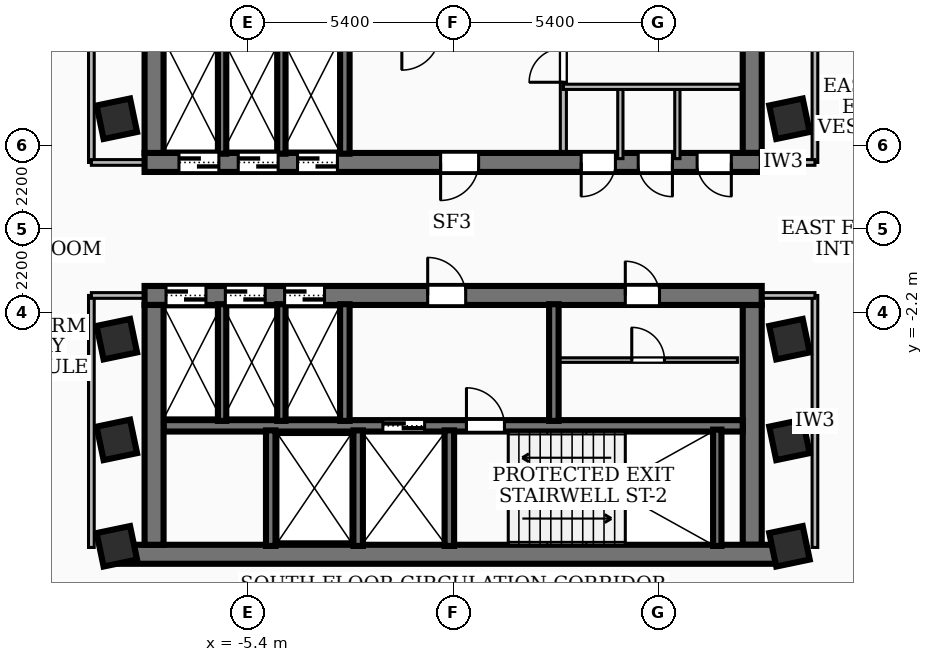
"""IFC4 building model, lengths in metres.
Left out: names, types, materials, properties, quantities, classifications, styles, units other than length and angle.
Written with IfcOpenShell. Run it as: python <this file> out.ifc"""

import sys

from ifc_helpers import new_model, si_unit, direction, frame, frame_2d, origin, origin_2d, place, context, subcontext, project, spatial, rectangle, extrude, element, fill, save


model = new_model("IFC4")
c1 = context("Model", 3, precision=1e-05, world=origin(), true_north=direction((0.0, 1.0)))
c2 = subcontext(c1, "Body", "Model", "MODEL_VIEW")
j1 = project(units=[si_unit("LENGTHUNIT", "METRE"), si_unit("PLANEANGLEUNIT", "RADIAN")], contexts=[c1])
p1 = place(None, origin())
s1 = spatial("IfcSite", under=j1, at=p1, CompositionType="ELEMENT")
p2 = place(p1, origin())
s2 = spatial("IfcBuilding", under=s1, at=p2, CompositionType="ELEMENT")
p3 = place(p2, frame((0.0, 0.0, 111.96)))
s3 = spatial("IfcBuildingStorey", under=s2, at=p3, CompositionType="ELEMENT", Elevation=111.96)
p4 = place(p3, frame((8.12, 1.75, 0.0), z_axis=(0.0, 0.0, 1.0), x_axis=(-1.0, 0.0, 0.0)))
e1 = element("IfcWall", 1, at=p4, inside=s3, PredefinedType="SHEAR", context=c2, shape_type="SweptSolid", body=[
    extrude(rectangle(XDim=16.24, YDim=0.5, at=frame_2d((8.12, 0.0))), origin(), (0.0, 0.0, 1.0), 4.06),
])
p5 = place(p4, frame((7.45, 0.0, 0.0)))
e2 = element("IfcOpeningElement", 2, at=p5, cuts=e1, PredefinedType="OPENING", context=c2, shape_type="SweptSolid", body=[
    extrude(rectangle(XDim=1.0, YDim=2.1, at=frame_2d((0.5, 1.05))), frame((0.0, 0.26, 0.0), z_axis=(0.0, -1.0, 0.0), x_axis=(1.0, 0.0, 0.0)), (0.0, 0.0, 1.0), 0.52),
])
p6 = place(p4, frame((14.285, 0.0, 0.0)))
e3 = element("IfcOpeningElement", 3, at=p6, cuts=e1, PredefinedType="OPENING", context=c2, shape_type="SweptSolid", body=[
    extrude(rectangle(XDim=1.05, YDim=2.15, at=frame_2d((0.525, 1.075))), frame((0.0, 0.26, 0.0), z_axis=(0.0, -1.0, 0.0), x_axis=(1.0, 0.0, 0.0)), (0.0, 0.0, 1.0), 0.52),
])
p7 = place(p4, frame((12.725, 0.0, 0.0)))
e4 = element("IfcOpeningElement", 4, at=p7, cuts=e1, PredefinedType="OPENING", context=c2, shape_type="SweptSolid", body=[
    extrude(rectangle(XDim=1.05, YDim=2.15, at=frame_2d((0.525, 1.075))), frame((0.0, 0.26, 0.0), z_axis=(0.0, -1.0, 0.0), x_axis=(1.0, 0.0, 0.0)), (0.0, 0.0, 1.0), 0.52),
])
p8 = place(p4, frame((11.165, 0.0, 0.0)))
e5 = element("IfcOpeningElement", 5, at=p8, cuts=e1, PredefinedType="OPENING", context=c2, shape_type="SweptSolid", body=[
    extrude(rectangle(XDim=1.05, YDim=2.15, at=frame_2d((0.525, 1.075))), frame((0.0, 0.26, 0.0), z_axis=(0.0, -1.0, 0.0), x_axis=(1.0, 0.0, 0.0)), (0.0, 0.0, 1.0), 0.52),
])
p9 = place(p4, frame((3.85, 0.0, 0.0)))
e6 = element("IfcOpeningElement", 6, at=p9, cuts=e1, PredefinedType="OPENING", context=c2, shape_type="SweptSolid", body=[
    extrude(rectangle(XDim=0.9, YDim=2.06, at=frame_2d((0.45, 1.03))), frame((0.0, 0.26, 0.0), z_axis=(0.0, -1.0, 0.0), x_axis=(1.0, 0.0, 0.0)), (0.0, 0.0, 1.0), 0.52),
])
p10 = place(p4, frame((2.35, 0.0, 0.0)))
e7 = element("IfcOpeningElement", 7, at=p10, cuts=e1, PredefinedType="OPENING", context=c2, shape_type="SweptSolid", body=[
    extrude(rectangle(XDim=0.9, YDim=2.06, at=frame_2d((0.45, 1.03))), frame((0.0, 0.26, 0.0), z_axis=(0.0, -1.0, 0.0), x_axis=(1.0, 0.0, 0.0)), (0.0, 0.0, 1.0), 0.52),
])
p11 = place(p4, frame((0.8, 0.0, 0.0)))
e8 = element("IfcOpeningElement", 8, at=p11, cuts=e1, PredefinedType="OPENING", context=c2, shape_type="SweptSolid", body=[
    extrude(rectangle(XDim=0.9, YDim=2.06, at=frame_2d((0.45, 1.03))), frame((0.0, 0.26, 0.0), z_axis=(0.0, -1.0, 0.0), x_axis=(1.0, 0.0, 0.0)), (0.0, 0.0, 1.0), 0.52),
])
for number, where, z_axis, x_axis in (
    (9, (-7.87, 2.0, 0.0), (0.0, 0.0, 1.0), (0.0, 1.0, 0.0)),
    (10, (7.87, 8.31, 0.0), (0.0, 0.0, 1.0), (0.0, -1.0, 0.0)),
):
    element("IfcWall", number, at=place(p3, frame(where, z_axis=z_axis, x_axis=x_axis)), inside=s3, PredefinedType="SHEAR", context=c2, shape_type="SweptSolid", body=[
        extrude(rectangle(XDim=6.31, YDim=0.5, at=frame_2d((3.155, 0.0))), origin(), (0.0, 0.0, 1.0), 4.06),
    ])
p12 = place(p3, frame((8.78, -8.56, 0.0), z_axis=(0.0, 0.0, 1.0), x_axis=(-1.0, 0.0, 0.0)))
e11 = element("IfcWall", 11, at=p12, inside=s3, PredefinedType="SHEAR", context=c2, shape_type="SweptSolid", body=[
    extrude(rectangle(XDim=17.56, YDim=0.5, at=frame_2d((8.78, 0.0))), origin(), (0.0, 0.0, 1.0), 4.06),
])
p13 = place(p3, frame((-8.12, -1.75, 0.0), z_axis=(0.0, 0.0, 1.0), x_axis=(1.0, 0.0, 0.0)))
e12 = element("IfcWall", 12, at=p13, inside=s3, PredefinedType="SHEAR", context=c2, shape_type="SweptSolid", body=[
    extrude(rectangle(XDim=16.24, YDim=0.5, at=frame_2d((8.12, 0.0))), origin(), (0.0, 0.0, 1.0), 4.06),
])
p14 = place(p13, frame((7.45, 0.0, 0.0)))
e13 = element("IfcOpeningElement", 13, at=p14, cuts=e12, PredefinedType="OPENING", context=c2, shape_type="SweptSolid", body=[
    extrude(rectangle(XDim=1.0, YDim=2.1, at=frame_2d((0.5, 1.05))), frame((0.0, 0.26, 0.0), z_axis=(0.0, -1.0, 0.0), x_axis=(1.0, 0.0, 0.0)), (0.0, 0.0, 1.0), 0.52),
])
p15 = place(p13, frame((12.65, 0.0, 0.0)))
e14 = element("IfcOpeningElement", 14, at=p15, cuts=e12, PredefinedType="OPENING", context=c2, shape_type="SweptSolid", body=[
    extrude(rectangle(XDim=0.9, YDim=2.06, at=frame_2d((0.45, 1.03))), frame((0.0, 0.26, 0.0), z_axis=(0.0, -1.0, 0.0), x_axis=(1.0, 0.0, 0.0)), (0.0, 0.0, 1.0), 0.52),
])
p16 = place(p13, frame((0.565, 0.0, 0.0)))
e15 = element("IfcOpeningElement", 15, at=p16, cuts=e12, PredefinedType="OPENING", context=c2, shape_type="SweptSolid", body=[
    extrude(rectangle(XDim=1.05, YDim=2.15, at=frame_2d((0.525, 1.075))), frame((0.0, 0.26, 0.0), z_axis=(0.0, -1.0, 0.0), x_axis=(1.0, 0.0, 0.0)), (0.0, 0.0, 1.0), 0.52),
])
p17 = place(p13, frame((2.125, 0.0, 0.0)))
e16 = element("IfcOpeningElement", 16, at=p17, cuts=e12, PredefinedType="OPENING", context=c2, shape_type="SweptSolid", body=[
    extrude(rectangle(XDim=1.05, YDim=2.15, at=frame_2d((0.525, 1.075))), frame((0.0, 0.26, 0.0), z_axis=(0.0, -1.0, 0.0), x_axis=(1.0, 0.0, 0.0)), (0.0, 0.0, 1.0), 0.52),
])
p18 = place(p13, frame((3.685, 0.0, 0.0)))
e17 = element("IfcOpeningElement", 17, at=p18, cuts=e12, PredefinedType="OPENING", context=c2, shape_type="SweptSolid", body=[
    extrude(rectangle(XDim=1.05, YDim=2.15, at=frame_2d((0.525, 1.075))), frame((0.0, 0.26, 0.0), z_axis=(0.0, -1.0, 0.0), x_axis=(1.0, 0.0, 0.0)), (0.0, 0.0, 1.0), 0.52),
])
for number, where, z_axis, x_axis in (
    (18, (-7.87, -8.31, 0.0), (0.0, 0.0, 1.0), (0.0, 1.0, 0.0)),
    (19, (7.87, -2.0, 0.0), (0.0, 0.0, 1.0), (0.0, -1.0, 0.0)),
):
    element("IfcWall", number, at=place(p3, frame(where, z_axis=z_axis, x_axis=x_axis)), inside=s3, PredefinedType="SHEAR", context=c2, shape_type="SweptSolid", body=[
        extrude(rectangle(XDim=6.31, YDim=0.5, at=frame_2d((3.155, 0.0))), origin(), (0.0, 0.0, 1.0), 4.06),
    ])
p19 = place(p3, frame((-7.62, -5.18, 0.0), z_axis=(0.0, 0.0, 1.0), x_axis=(1.0, 0.0, 0.0)))
e20 = element("IfcWall", 20, at=p19, inside=s3, PredefinedType="SOLIDWALL", context=c2, shape_type="SweptSolid", body=[
    extrude(rectangle(XDim=15.24, YDim=0.3, at=frame_2d((7.62, 0.0))), origin(), (0.0, 0.0, 1.0), 4.06),
])
p20 = place(p19, frame((5.77, 0.0, 0.0)))
e21 = element("IfcOpeningElement", 21, at=p20, cuts=e20, PredefinedType="OPENING", context=c2, shape_type="SweptSolid", body=[
    extrude(rectangle(XDim=1.1, YDim=2.15, at=frame_2d((0.55, 1.075))), frame((0.0, 0.16, 0.0), z_axis=(0.0, -1.0, 0.0), x_axis=(1.0, 0.0, 0.0)), (0.0, 0.0, 1.0), 0.32),
])
p21 = place(p19, frame((7.97, 0.0, 0.0)))
e22 = element("IfcOpeningElement", 22, at=p21, cuts=e20, PredefinedType="OPENING", context=c2, shape_type="SweptSolid", body=[
    extrude(rectangle(XDim=1.0, YDim=2.1, at=frame_2d((0.5, 1.05))), frame((0.0, 0.16, 0.0), z_axis=(0.0, -1.0, 0.0), x_axis=(1.0, 0.0, 0.0)), (0.0, 0.0, 1.0), 0.32),
])
p22 = place(p3, frame((6.95, -8.34, 0.0), z_axis=(0.0, 0.0, 1.0), x_axis=(0.0, 1.0, 0.0)))
e23 = element("IfcWall", 23, at=p22, inside=s3, PredefinedType="SOLIDWALL", context=c2, shape_type="SweptSolid", body=[
    extrude(rectangle(XDim=3.06, YDim=0.22, at=frame_2d((1.53, 0.0))), origin(), (0.0, 0.0, 1.0), 4.06),
])
p23 = place(p3, frame((-2.85, 1.98, 0.0), z_axis=(0.0, 0.0, 1.0), x_axis=(0.0, 1.0, 0.0)))
e24 = element("IfcWall", 24, at=p23, inside=s3, PredefinedType="SOLIDWALL", context=c2, shape_type="SweptSolid", body=[
    extrude(rectangle(XDim=3.07, YDim=0.25, at=frame_2d((1.535, 0.0))), origin(), (0.0, 0.0, 1.0), 4.06),
])
for number, where, z_axis, x_axis in (
    (25, (-0.1, -8.34, 0.0), (0.0, 0.0, 1.0), (0.0, 1.0, 0.0)),
    (26, (-2.5, -8.34, 0.0), (0.0, 0.0, 1.0), (0.0, 1.0, 0.0)),
    (27, (-4.8, -8.34, 0.0), (0.0, 0.0, 1.0), (0.0, 1.0, 0.0)),
):
    element("IfcWall", number, at=place(p3, frame(where, z_axis=z_axis, x_axis=x_axis)), inside=s3, PredefinedType="SOLIDWALL", context=c2, shape_type="SweptSolid", body=[
        extrude(rectangle(XDim=3.04, YDim=0.25, at=frame_2d((1.52, 0.0))), origin(), (0.0, 0.0, 1.0), 4.06),
    ])
for number, where, z_axis, x_axis in (
    (28, (-2.85, -5.05, 0.0), (0.0, 0.0, 1.0), (0.0, 1.0, 0.0)),
    (29, (2.65, -5.05, 0.0), (0.0, 0.0, 1.0), (0.0, 1.0, 0.0)),
):
    element("IfcWall", number, at=place(p3, frame(where, z_axis=z_axis, x_axis=x_axis)), inside=s3, PredefinedType="SOLIDWALL", context=c2, shape_type="SweptSolid", body=[
        extrude(rectangle(XDim=3.07, YDim=0.25, at=frame_2d((1.535, 0.0))), origin(), (0.0, 0.0, 1.0), 4.06),
    ])
for number, where, z_axis, x_axis in (
    (30, (-6.08, 1.98, 0.0), (0.0, 0.0, 1.0), (0.0, 1.0, 0.0)),
    (31, (-4.52, 1.98, 0.0), (0.0, 0.0, 1.0), (0.0, 1.0, 0.0)),
    (32, (-6.08, -5.05, 0.0), (0.0, 0.0, 1.0), (0.0, 1.0, 0.0)),
    (33, (-4.52, -5.05, 0.0), (0.0, 0.0, 1.0), (0.0, 1.0, 0.0)),
):
    element("IfcWall", number, at=place(p3, frame(where, z_axis=z_axis, x_axis=x_axis)), inside=s3, PredefinedType="SOLIDWALL", context=c2, shape_type="SweptSolid", body=[
        extrude(rectangle(XDim=3.07, YDim=0.22, at=frame_2d((1.535, 0.0))), origin(), (0.0, 0.0, 1.0), 4.06),
    ])
for number, where, z_axis, x_axis in (
    (34, (-8.85, -5.55, 0.0), (0.0, 0.0, 1.0), (0.979, 0.204, 0.0)),
    (35, (-8.85, -2.9, 0.0), (0.0, 0.0, 1.0), (0.979, 0.204, 0.0)),
    (36, (-8.85, 2.9, 0.0), (0.0, 0.0, 1.0), (0.979, 0.204, 0.0)),
    (37, (8.85, -5.55, 0.0), (0.0, 0.0, 1.0), (0.979, 0.204, 0.0)),
    (38, (8.85, -2.9, 0.0), (0.0, 0.0, 1.0), (0.979, 0.204, 0.0)),
    (39, (8.85, 2.9, 0.0), (0.0, 0.0, 1.0), (0.979, 0.204, 0.0)),
    (40, (8.85, -8.35, 0.0), (0.0, 0.0, 1.0), (0.979, 0.204, 0.0)),
    (41, (-8.85, -8.35, 0.0), (0.0, 0.0, 1.0), (0.979, 0.204, 0.0)),
):
    element("IfcColumn", number, at=place(p3, frame(where, z_axis=z_axis, x_axis=x_axis)), inside=s3, PredefinedType="COLUMN", context=c2, shape_type="SweptSolid", body=[
        extrude(rectangle(XDim=0.9, YDim=0.9, at=origin_2d()), origin(), (0.0, 0.0, 1.0), 4.32),
    ])
p24 = place(p3, frame((2.9, 2.04, 0.0), z_axis=(0.0, 0.0, 1.0), x_axis=(0.0, 1.0, 0.0)))
e42 = element("IfcWall", 42, at=p24, inside=s3, PredefinedType="PARTITIONING", context=c2, shape_type="SweptSolid", body=[
    extrude(rectangle(XDim=2.94, YDim=0.16, at=frame_2d((1.47, 0.0))), origin(), (0.0, 0.0, 1.0), 3.29),
])
p25 = place(p24, frame((1.82, 0.0, 0.0)))
e43 = element("IfcOpeningElement", 43, at=p25, cuts=e42, PredefinedType="OPENING", context=c2, shape_type="SweptSolid", body=[
    extrude(rectangle(XDim=0.9, YDim=2.06, at=frame_2d((0.45, 1.03))), frame((0.0, 0.09, 0.0), z_axis=(0.0, -1.0, 0.0), x_axis=(1.0, 0.0, 0.0)), (0.0, 0.0, 1.0), 0.18),
])
p26 = place(p3, frame((2.9, 3.74, 0.0), z_axis=(0.0, 0.0, 1.0), x_axis=(1.0, 0.0, 0.0)))
e44 = element("IfcWall", 44, at=p26, inside=s3, PredefinedType="PARTITIONING", context=c2, shape_type="SweptSolid", body=[
    extrude(rectangle(XDim=4.65, YDim=0.138, at=frame_2d((2.325, 0.0))), origin(), (0.0, 0.0, 1.0), 4.06),
])
p27 = place(p3, frame((2.8, -3.45, 0.0), z_axis=(0.0, 0.0, 1.0), x_axis=(1.0, 0.0, 0.0)))
e45 = element("IfcWall", 45, at=p27, inside=s3, PredefinedType="PARTITIONING", context=c2, shape_type="SweptSolid", body=[
    extrude(rectangle(XDim=4.68, YDim=0.12, at=frame_2d((2.34, 0.0))), origin(), (0.0, 0.0, 1.0), 4.06),
])
p28 = place(p27, frame((1.9, 0.0, 0.0)))
e46 = element("IfcOpeningElement", 46, at=p28, cuts=e45, PredefinedType="OPENING", context=c2, shape_type="SweptSolid", body=[
    extrude(rectangle(XDim=0.86, YDim=2.04, at=frame_2d((0.43, 1.02))), frame((0.0, 0.07, 0.0), z_axis=(0.0, -1.0, 0.0), x_axis=(1.0, 0.0, 0.0)), (0.0, 0.0, 1.0), 0.14),
])
for number, where, z_axis, x_axis in (
    (47, (4.4, 1.85, 0.0), (0.0, 0.0, 1.0), (0.0, 1.0, 0.0)),
    (48, (5.9, 1.85, 0.0), (0.0, 0.0, 1.0), (0.0, 1.0, 0.0)),
):
    element("IfcWall", number, at=place(p3, frame(where, z_axis=z_axis, x_axis=x_axis)), inside=s3, PredefinedType="PARTITIONING", context=c2, shape_type="SweptSolid", body=[
        extrude(rectangle(XDim=1.89, YDim=0.138, at=frame_2d((0.945, 0.0))), origin(), (0.0, 0.0, 1.0), 3.29),
    ])
p29 = place(p3, frame((-9.52, 1.75, 0.0), z_axis=(0.0, 0.0, 1.0), x_axis=(0.0, 1.0, 0.0)))
e49 = element("IfcWall", 49, at=p29, inside=s3, PredefinedType="PARTITIONING", context=c2, shape_type="SweptSolid", body=[
    extrude(rectangle(XDim=6.63, YDim=0.15, at=frame_2d((3.315, 0.0))), origin(), (0.0, 0.0, 1.0), 3.29),
])
p30 = place(p3, frame((-7.85, 1.75, 0.0), z_axis=(0.0, 0.0, 1.0), x_axis=(-1.0, 0.0, 0.0)))
e50 = element("IfcWall", 50, at=p30, inside=s3, PredefinedType="PARTITIONING", context=c2, shape_type="SweptSolid", body=[
    extrude(rectangle(XDim=1.67, YDim=0.15, at=frame_2d((0.835, 0.0))), origin(), (0.0, 0.0, 1.0), 3.29),
])
p31 = place(p3, frame((-9.52, -8.38, 0.0), z_axis=(0.0, 0.0, 1.0), x_axis=(0.0, 1.0, 0.0)))
e51 = element("IfcWall", 51, at=p31, inside=s3, PredefinedType="PARTITIONING", context=c2, shape_type="SweptSolid", body=[
    extrude(rectangle(XDim=6.63, YDim=0.15, at=frame_2d((3.315, 0.0))), origin(), (0.0, 0.0, 1.0), 3.29),
])
p32 = place(p3, frame((-7.85, -1.75, 0.0), z_axis=(0.0, 0.0, 1.0), x_axis=(-1.0, 0.0, 0.0)))
e52 = element("IfcWall", 52, at=p32, inside=s3, PredefinedType="PARTITIONING", context=c2, shape_type="SweptSolid", body=[
    extrude(rectangle(XDim=1.67, YDim=0.15, at=frame_2d((0.835, 0.0))), origin(), (0.0, 0.0, 1.0), 3.29),
])
p33 = place(p3, frame((9.52, 1.75, 0.0), z_axis=(0.0, 0.0, 1.0), x_axis=(0.0, 1.0, 0.0)))
e53 = element("IfcWall", 53, at=p33, inside=s3, PredefinedType="PARTITIONING", context=c2, shape_type="SweptSolid", body=[
    extrude(rectangle(XDim=6.63, YDim=0.15, at=frame_2d((3.315, 0.0))), origin(), (0.0, 0.0, 1.0), 3.29),
])
p34 = place(p3, frame((7.85, 1.75, 0.0), z_axis=(0.0, 0.0, 1.0), x_axis=(1.0, 0.0, 0.0)))
e54 = element("IfcWall", 54, at=p34, inside=s3, PredefinedType="PARTITIONING", context=c2, shape_type="SweptSolid", body=[
    extrude(rectangle(XDim=1.67, YDim=0.15, at=frame_2d((0.835, 0.0))), origin(), (0.0, 0.0, 1.0), 3.29),
])
p35 = place(p3, frame((9.52, -8.38, 0.0), z_axis=(0.0, 0.0, 1.0), x_axis=(0.0, 1.0, 0.0)))
e55 = element("IfcWall", 55, at=p35, inside=s3, PredefinedType="PARTITIONING", context=c2, shape_type="SweptSolid", body=[
    extrude(rectangle(XDim=6.63, YDim=0.15, at=frame_2d((3.315, 0.0))), origin(), (0.0, 0.0, 1.0), 3.29),
])
p36 = place(p3, frame((7.85, -1.75, 0.0), z_axis=(0.0, 0.0, 1.0), x_axis=(1.0, 0.0, 0.0)))
e56 = element("IfcWall", 56, at=p36, inside=s3, PredefinedType="PARTITIONING", context=c2, shape_type="SweptSolid", body=[
    extrude(rectangle(XDim=1.67, YDim=0.15, at=frame_2d((0.835, 0.0))), origin(), (0.0, 0.0, 1.0), 3.29),
])
p37 = place(p5, origin())
e57 = element("IfcDoor", 57, at=p37, inside=s3, OperationType="SINGLE_SWING_RIGHT", PredefinedType="DOOR", context=c2, shape_type="SweptSolid", body=[
    extrude(rectangle(XDim=1.0, YDim=2.1, at=frame_2d((0.5, 1.05))), frame((0.0, 0.025, 0.0), z_axis=(0.0, -1.0, 0.0), x_axis=(1.0, 0.0, 0.0)), (0.0, 0.0, 1.0), 0.05),
])
fill(e2, e57)
p38 = place(p14, origin())
e58 = element("IfcDoor", 58, at=p38, inside=s3, OperationType="SINGLE_SWING_LEFT", PredefinedType="DOOR", context=c2, shape_type="SweptSolid", body=[
    extrude(rectangle(XDim=1.0, YDim=2.1, at=frame_2d((0.5, 1.05))), frame((0.0, 0.025, 0.0), z_axis=(0.0, -1.0, 0.0), x_axis=(1.0, 0.0, 0.0)), (0.0, 0.0, 1.0), 0.05),
])
fill(e13, e58)
p39 = place(p20, origin())
e59 = element("IfcDoor", 59, at=p39, inside=s3, OperationType="DOUBLE_DOOR_SLIDING", PredefinedType="DOOR", context=c2, shape_type="SweptSolid", body=[
    extrude(rectangle(XDim=1.1, YDim=2.15, at=frame_2d((0.55, 1.075))), frame((0.0, 0.025, 0.0), z_axis=(0.0, -1.0, 0.0), x_axis=(1.0, 0.0, 0.0)), (0.0, 0.0, 1.0), 0.05),
])
fill(e21, e59)
p40 = place(p21, origin())
e60 = element("IfcDoor", 60, at=p40, inside=s3, OperationType="SINGLE_SWING_LEFT", PredefinedType="DOOR", context=c2, shape_type="SweptSolid", body=[
    extrude(rectangle(XDim=1.0, YDim=2.1, at=frame_2d((0.5, 1.05))), frame((0.0, 0.025, 0.0), z_axis=(0.0, -1.0, 0.0), x_axis=(1.0, 0.0, 0.0)), (0.0, 0.0, 1.0), 0.05),
])
fill(e22, e60)
p41 = place(p6, origin())
e61 = element("IfcDoor", 61, at=p41, inside=s3, OperationType="DOUBLE_DOOR_SLIDING", PredefinedType="DOOR", context=c2, shape_type="SweptSolid", body=[
    extrude(rectangle(XDim=1.05, YDim=2.15, at=frame_2d((0.525, 1.075))), frame((0.0, 0.025, 0.0), z_axis=(0.0, -1.0, 0.0), x_axis=(1.0, 0.0, 0.0)), (0.0, 0.0, 1.0), 0.05),
])
fill(e3, e61)
p42 = place(p7, origin())
e62 = element("IfcDoor", 62, at=p42, inside=s3, OperationType="DOUBLE_DOOR_SLIDING", PredefinedType="DOOR", context=c2, shape_type="SweptSolid", body=[
    extrude(rectangle(XDim=1.05, YDim=2.15, at=frame_2d((0.525, 1.075))), frame((0.0, 0.025, 0.0), z_axis=(0.0, -1.0, 0.0), x_axis=(1.0, 0.0, 0.0)), (0.0, 0.0, 1.0), 0.05),
])
fill(e4, e62)
p43 = place(p8, origin())
e63 = element("IfcDoor", 63, at=p43, inside=s3, OperationType="DOUBLE_DOOR_SLIDING", PredefinedType="DOOR", context=c2, shape_type="SweptSolid", body=[
    extrude(rectangle(XDim=1.05, YDim=2.15, at=frame_2d((0.525, 1.075))), frame((0.0, 0.025, 0.0), z_axis=(0.0, -1.0, 0.0), x_axis=(1.0, 0.0, 0.0)), (0.0, 0.0, 1.0), 0.05),
])
fill(e5, e63)
p44 = place(p15, origin())
e64 = element("IfcDoor", 64, at=p44, inside=s3, OperationType="SINGLE_SWING_LEFT", PredefinedType="DOOR", context=c2, shape_type="SweptSolid", body=[
    extrude(rectangle(XDim=0.9, YDim=2.06, at=frame_2d((0.45, 1.03))), frame((0.0, 0.025, 0.0), z_axis=(0.0, -1.0, 0.0), x_axis=(1.0, 0.0, 0.0)), (0.0, 0.0, 1.0), 0.05),
])
fill(e14, e64)
p45 = place(p16, origin())
e65 = element("IfcDoor", 65, at=p45, inside=s3, OperationType="DOUBLE_DOOR_SLIDING", PredefinedType="DOOR", context=c2, shape_type="SweptSolid", body=[
    extrude(rectangle(XDim=1.05, YDim=2.15, at=frame_2d((0.525, 1.075))), frame((0.0, 0.025, 0.0), z_axis=(0.0, -1.0, 0.0), x_axis=(1.0, 0.0, 0.0)), (0.0, 0.0, 1.0), 0.05),
])
fill(e15, e65)
p46 = place(p17, origin())
e66 = element("IfcDoor", 66, at=p46, inside=s3, OperationType="DOUBLE_DOOR_SLIDING", PredefinedType="DOOR", context=c2, shape_type="SweptSolid", body=[
    extrude(rectangle(XDim=1.05, YDim=2.15, at=frame_2d((0.525, 1.075))), frame((0.0, 0.025, 0.0), z_axis=(0.0, -1.0, 0.0), x_axis=(1.0, 0.0, 0.0)), (0.0, 0.0, 1.0), 0.05),
])
fill(e16, e66)
p47 = place(p18, origin())
e67 = element("IfcDoor", 67, at=p47, inside=s3, OperationType="DOUBLE_DOOR_SLIDING", PredefinedType="DOOR", context=c2, shape_type="SweptSolid", body=[
    extrude(rectangle(XDim=1.05, YDim=2.15, at=frame_2d((0.525, 1.075))), frame((0.0, 0.025, 0.0), z_axis=(0.0, -1.0, 0.0), x_axis=(1.0, 0.0, 0.0)), (0.0, 0.0, 1.0), 0.05),
])
fill(e17, e67)
p48 = place(p9, origin())
e68 = element("IfcDoor", 68, at=p48, inside=s3, OperationType="SINGLE_SWING_RIGHT", PredefinedType="DOOR", context=c2, shape_type="SweptSolid", body=[
    extrude(rectangle(XDim=0.9, YDim=2.06, at=frame_2d((0.45, 1.03))), frame((0.0, 0.025, 0.0), z_axis=(0.0, -1.0, 0.0), x_axis=(1.0, 0.0, 0.0)), (0.0, 0.0, 1.0), 0.05),
])
fill(e6, e68)
p49 = place(p10, origin())
e69 = element("IfcDoor", 69, at=p49, inside=s3, OperationType="SINGLE_SWING_LEFT", PredefinedType="DOOR", context=c2, shape_type="SweptSolid", body=[
    extrude(rectangle(XDim=0.9, YDim=2.06, at=frame_2d((0.45, 1.03))), frame((0.0, 0.025, 0.0), z_axis=(0.0, -1.0, 0.0), x_axis=(1.0, 0.0, 0.0)), (0.0, 0.0, 1.0), 0.05),
])
fill(e7, e69)
p50 = place(p11, origin())
e70 = element("IfcDoor", 70, at=p50, inside=s3, OperationType="SINGLE_SWING_LEFT", PredefinedType="DOOR", context=c2, shape_type="SweptSolid", body=[
    extrude(rectangle(XDim=0.9, YDim=2.06, at=frame_2d((0.45, 1.03))), frame((0.0, 0.025, 0.0), z_axis=(0.0, -1.0, 0.0), x_axis=(1.0, 0.0, 0.0)), (0.0, 0.0, 1.0), 0.05),
])
fill(e8, e70)
p51 = place(p25, origin())
e71 = element("IfcDoor", 71, at=p51, inside=s3, OperationType="SINGLE_SWING_LEFT", PredefinedType="DOOR", context=c2, shape_type="SweptSolid", body=[
    extrude(rectangle(XDim=0.9, YDim=2.06, at=frame_2d((0.45, 1.03))), frame((0.0, 0.025, 0.0), z_axis=(0.0, -1.0, 0.0), x_axis=(1.0, 0.0, 0.0)), (0.0, 0.0, 1.0), 0.05),
])
fill(e43, e71)
p52 = place(p28, origin())
e72 = element("IfcDoor", 72, at=p52, inside=s3, OperationType="SINGLE_SWING_LEFT", PredefinedType="DOOR", context=c2, shape_type="SweptSolid", body=[
    extrude(rectangle(XDim=0.86, YDim=2.04, at=frame_2d((0.43, 1.02))), frame((0.0, 0.025, 0.0), z_axis=(0.0, -1.0, 0.0), x_axis=(1.0, 0.0, 0.0)), (0.0, 0.0, 1.0), 0.05),
])
fill(e46, e72)
save(model, sys.argv[1])
